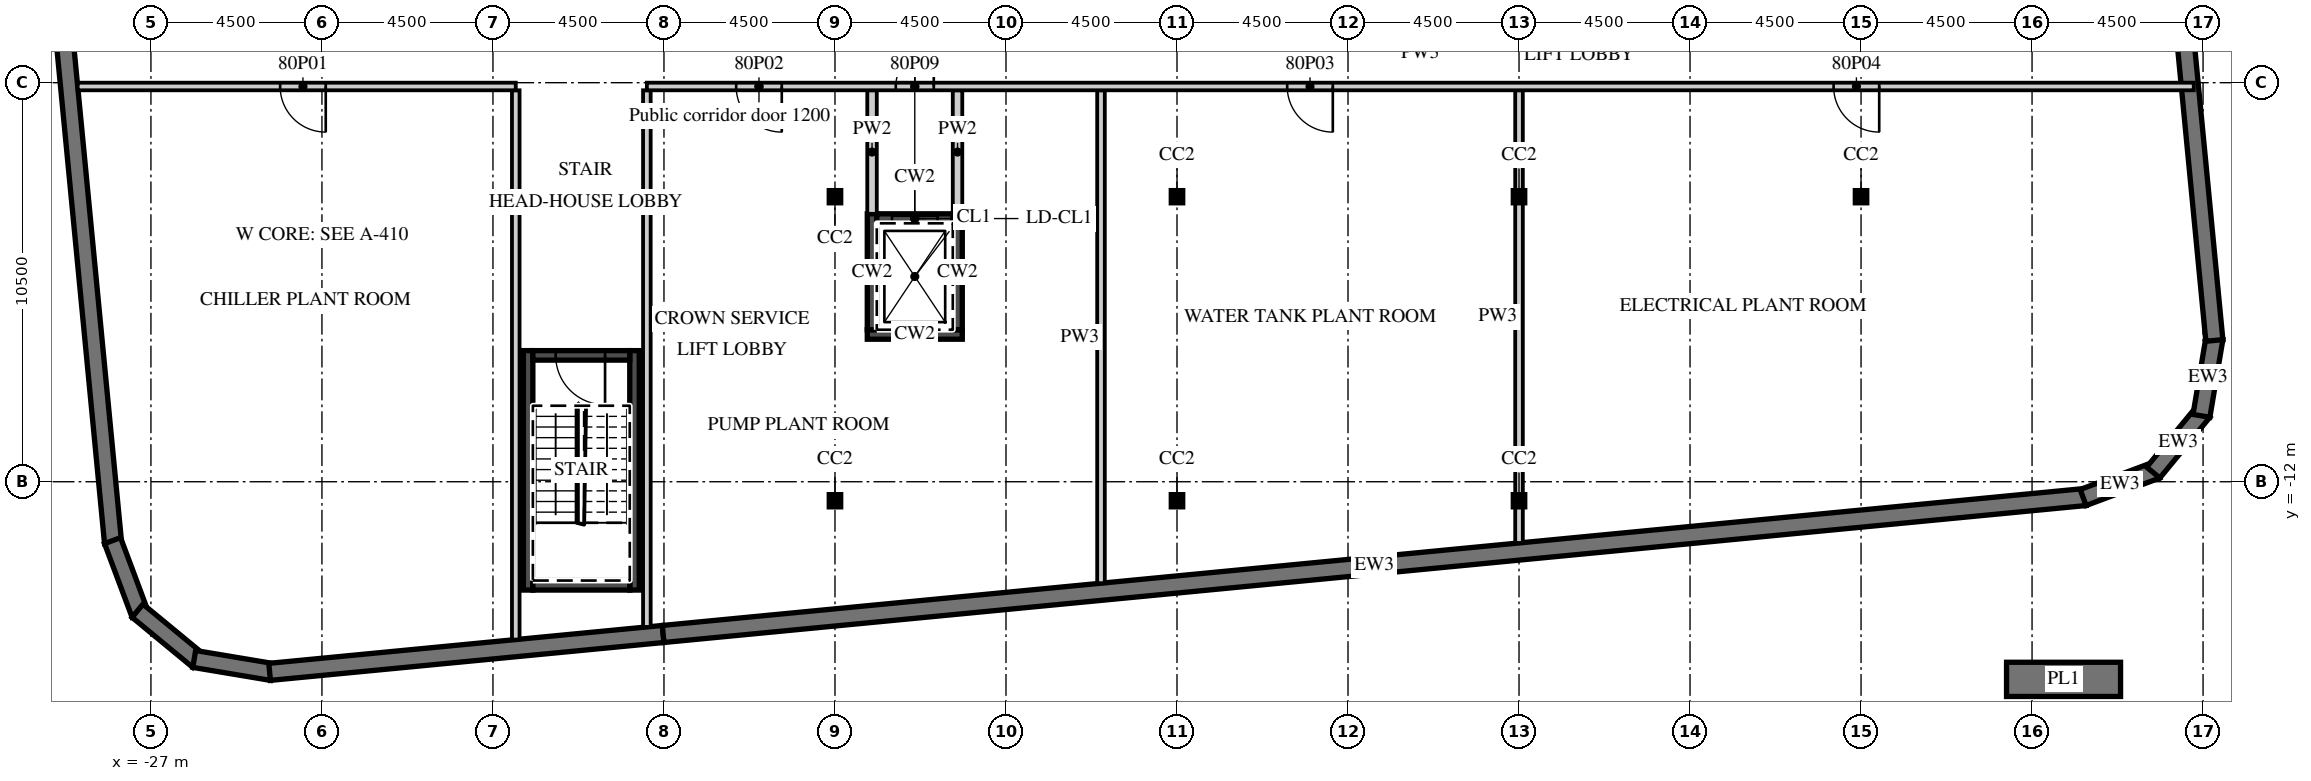
"""IFC4 building model, lengths in metres.
Left out: names, types, materials, properties, quantities, classifications, styles, units other than length and angle.
Written with IfcOpenShell. Run it as: python <this file> out.ifc"""

import sys

from ifc_helpers import new_model, si_unit, direction, frame, frame_2d, origin, origin_2d, place, context, subcontext, project, spatial, polyline, rectangle, i_section, outline, extrude, element, fill, save


model = new_model("IFC4")
c1 = context("Model", 3, precision=1e-05, world=origin(), true_north=direction((0.0, 1.0)))
c2 = subcontext(c1, "Body", "Model", "MODEL_VIEW")
j1 = project(units=[si_unit("LENGTHUNIT", "METRE"), si_unit("PLANEANGLEUNIT", "RADIAN")], contexts=[c1])
p1 = place(None, origin())
s1 = spatial("IfcSite", under=j1, at=p1, CompositionType="ELEMENT")
p2 = place(p1, origin())
s2 = spatial("IfcBuilding", under=s1, at=p2, CompositionType="ELEMENT")
p3 = place(p2, frame((0.0, 0.0, 317.8)))
s3 = spatial("IfcBuildingStorey", under=s2, at=p3, CompositionType="ELEMENT", Elevation=317.8)
for number, where, z_axis, x_axis in (
    (1, (-9.0, -12.5, 0.0), (0.0, 0.0, 1.0), (1.0, 0.0, 0.0)),
    (2, (-9.0, -4.5, 0.0), (0.0, 0.0, 1.0), (1.0, 0.0, 0.0)),
    (3, (0.0, -12.5, 0.0), (0.0, 0.0, 1.0), (1.0, 0.0, 0.0)),
    (4, (0.0, -4.5, 0.0), (0.0, 0.0, 1.0), (1.0, 0.0, 0.0)),
    (5, (9.0, -12.5, 0.0), (0.0, 0.0, 1.0), (1.0, 0.0, 0.0)),
    (6, (9.0, -4.5, 0.0), (0.0, 0.0, 1.0), (1.0, 0.0, 0.0)),
    (7, (18.0, -4.5, 0.0), (0.0, 0.0, 1.0), (1.0, 0.0, 0.0)),
):
    element("IfcColumn", number, at=place(p3, frame(where, z_axis=z_axis, x_axis=x_axis)), inside=s3, PredefinedType="COLUMN", context=c2, shape_type="SweptSolid", body=[
        extrude(i_section(OverallWidth=0.3, OverallDepth=0.32, WebThickness=0.011, FlangeThickness=0.021, FilletRadius=0.027, at=origin_2d()), origin(), (0.0, 0.0, 1.0), 4.0),
    ])
p4 = place(p3, frame((-30.297, 10.283, 0.0), z_axis=(0.0, 0.0, 1.0), x_axis=(0.095844987077, -0.995396272071, 0.0)))
e8 = element("IfcWall", 8, at=p4, inside=s3, PredefinedType="SOLIDWALL", context=c2, shape_type="SweptSolid", body=[
    extrude(rectangle(XDim=24.0, YDim=0.45, at=frame_2d((12.0, 0.0))), origin(), (0.0, 0.0, 1.0), 3.6),
])
p5 = place(p3, frame((-28.01, -13.55, 0.0), z_axis=(0.0, 0.0, 1.0), x_axis=(0.350192909346, -0.936677599948, 0.0)))
e9 = element("IfcWall", 9, at=p5, inside=s3, PredefinedType="SOLIDWALL", context=c2, shape_type="SweptSolid", body=[
    extrude(outline(polyline([(0.0, -0.225), (2.071, -0.225), (1.95, 0.225), (0.121, 0.225), (0.0, -0.225)])), origin(), (0.0, 0.0, 1.0), 3.6),
])
for number, where, z_axis, x_axis in (
    (10, (-27.353, -15.394, 0.0), (0.0, 0.0, 1.0), (0.772, -0.636, 0.0)),
    (11, (-25.861, -16.663, 0.0), (0.0, 0.0, 1.0), (0.986, -0.165, 0.0)),
):
    element("IfcWall", number, at=place(p3, frame(where, z_axis=z_axis, x_axis=x_axis)), inside=s3, PredefinedType="SOLIDWALL", context=c2, shape_type="SweptSolid", body=[
        extrude(outline(polyline([(0.0, -0.225), (2.071, -0.225), (1.95, 0.225), (0.121, 0.225), (0.0, -0.225)])), origin(), (0.0, 0.0, 1.0), 3.6),
    ])
p6 = place(p3, frame((-23.878, -17.003, 0.0), z_axis=(0.0, 0.0, 1.0), x_axis=(0.995395045647, 0.095857723225, 0.0)))
e12 = element("IfcWall", 12, at=p6, inside=s3, PredefinedType="SOLIDWALL", context=c2, shape_type="SweptSolid", body=[
    extrude(rectangle(XDim=10.404, YDim=0.45, at=frame_2d((5.202, 0.0))), origin(), (0.0, 0.0, 1.0), 3.6),
])
p7 = place(p3, frame((-13.521, -16.005, 0.0), z_axis=(0.0, 0.0, 1.0), x_axis=(0.995396551785, 0.095842082069, 0.0)))
e13 = element("IfcWall", 13, at=p7, inside=s3, PredefinedType="SOLIDWALL", context=c2, shape_type="SweptSolid", body=[
    extrude(rectangle(XDim=37.596, YDim=0.45, at=frame_2d((18.798, 0.0))), origin(), (0.0, 0.0, 1.0), 3.6),
])
for number, where, z_axis, x_axis in (
    (14, (23.844, -12.415, 0.0), (0.0, 0.0, 1.0), (0.937, 0.35, 0.0)),
    (15, (25.689, -11.758, 0.0), (0.0, 0.0, 1.0), (0.636, 0.772, 0.0)),
):
    element("IfcWall", number, at=place(p3, frame(where, z_axis=z_axis, x_axis=x_axis)), inside=s3, PredefinedType="SOLIDWALL", context=c2, shape_type="SweptSolid", body=[
        extrude(outline(polyline([(0.0, -0.225), (2.071, -0.225), (1.95, 0.225), (0.121, 0.225), (0.0, -0.225)])), origin(), (0.0, 0.0, 1.0), 3.6),
    ])
p8 = place(p3, frame((26.958, -10.266, 0.0), z_axis=(0.0, 0.0, 1.0), x_axis=(0.165068144653, 0.986282164302, 0.0)))
e16 = element("IfcWall", 16, at=p8, inside=s3, PredefinedType="SOLIDWALL", context=c2, shape_type="SweptSolid", body=[
    extrude(outline(polyline([(0.0, -0.225), (2.071, -0.225), (1.95, 0.225), (0.121, 0.225), (0.0, -0.225)])), origin(), (0.0, 0.0, 1.0), 3.6),
])
p9 = place(p3, frame((27.297, -8.283, 0.0), z_axis=(0.0, 0.0, 1.0), x_axis=(-0.095844987077, 0.995396272071, 0.0)))
e17 = element("IfcWall", 17, at=p9, inside=s3, PredefinedType="SOLIDWALL", context=c2, shape_type="SweptSolid", body=[
    extrude(rectangle(XDim=24.0, YDim=0.45, at=frame_2d((12.0, 0.0))), origin(), (0.0, 0.0, 1.0), 3.6),
])
p10 = place(p3, frame((24.829, -17.2, 0.0), z_axis=(0.0, 0.0, 1.0), x_axis=(-1.0, 0.0, 0.0)))
e18 = element("IfcWall", 18, at=p10, inside=s3, PredefinedType="SOLIDWALL", context=c2, shape_type="SweptSolid", body=[
    extrude(rectangle(XDim=3.0, YDim=0.9, at=frame_2d((1.5, 0.0))), origin(), (0.0, 0.0, 1.0), 0.6),
])
p11 = place(p3, frame((-8.15, -8.125, 0.0), z_axis=(0.0, 0.0, 1.0), x_axis=(1.0, 0.0, 0.0)))
e19 = element("IfcWall", 19, at=p11, inside=s3, PredefinedType="SHEAR", context=c2, shape_type="SweptSolid", body=[
    extrude(rectangle(XDim=2.5, YDim=0.25, at=frame_2d((1.25, 0.0))), origin(), (0.0, 0.0, 1.0), 3.6),
])
for number, where, z_axis, x_axis in (
    (20, (-8.025, -8.0, 0.0), (0.0, 0.0, 1.0), (0.0, 1.0, 0.0)),
    (21, (-5.775, -8.0, 0.0), (0.0, 0.0, 1.0), (0.0, 1.0, 0.0)),
):
    element("IfcWall", number, at=place(p3, frame(where, z_axis=z_axis, x_axis=x_axis)), inside=s3, PredefinedType="SHEAR", context=c2, shape_type="SweptSolid", body=[
        extrude(rectangle(XDim=3.05, YDim=0.25, at=frame_2d((1.525, 0.0))), origin(), (0.0, 0.0, 1.0), 3.6),
    ])
p12 = place(p3, frame((-7.9, -5.075, 0.0), z_axis=(0.0, 0.0, 1.0), x_axis=(1.0, 0.0, 0.0)))
e22 = element("IfcWall", 22, at=p12, inside=s3, PredefinedType="SHEAR", context=c2, shape_type="SweptSolid", body=[
    extrude(rectangle(XDim=2.0, YDim=0.25, at=frame_2d((1.0, 0.0))), origin(), (0.0, 0.0, 1.0), 3.6),
])
p13 = place(p12, frame((0.4, 0.0, 0.0)))
e23 = element("IfcOpeningElement", 23, at=p13, cuts=e22, PredefinedType="OPENING", context=c2, shape_type="SweptSolid", body=[
    extrude(rectangle(XDim=1.2, YDim=2.1, at=frame_2d((0.6, 1.05))), frame((0.0, 0.135, 0.0), z_axis=(0.0, -1.0, 0.0), x_axis=(1.0, 0.0, 0.0)), (0.0, 0.0, 1.0), 0.27),
])
for number, where, z_axis, x_axis in (
    (24, (-8.025, -4.95, 0.0), (0.0, 0.0, 1.0), (0.0, 1.0, 0.0)),
    (25, (-5.775, -4.95, 0.0), (0.0, 0.0, 1.0), (0.0, 1.0, 0.0)),
):
    element("IfcWall", number, at=place(p3, frame(where, z_axis=z_axis, x_axis=x_axis)), inside=s3, PredefinedType="PARTITIONING", context=c2, shape_type="SweptSolid", body=[
        extrude(rectangle(XDim=3.25, YDim=0.25, at=frame_2d((1.625, 0.0))), origin(), (0.0, 0.0, 1.0), 3.6),
    ])
for number, where, z_axis, x_axis in (
    (26, (-17.075, -14.85, 0.0), (0.0, 0.0, 1.0), (0.0, 1.0, 0.0)),
    (27, (-14.275, -14.85, 0.0), (0.0, 0.0, 1.0), (0.0, 1.0, 0.0)),
):
    element("IfcWall", number, at=place(p3, frame(where, z_axis=z_axis, x_axis=x_axis)), inside=s3, PredefinedType="SHEAR", context=c2, shape_type="SweptSolid", body=[
        extrude(rectangle(XDim=6.3, YDim=0.25, at=frame_2d((3.15, 0.0))), origin(), (0.0, 0.0, 1.0), 3.6),
    ])
p14 = place(p3, frame((-16.95, -14.725, 0.0), z_axis=(0.0, 0.0, 1.0), x_axis=(1.0, 0.0, 0.0)))
e28 = element("IfcWall", 28, at=p14, inside=s3, PredefinedType="SHEAR", context=c2, shape_type="SweptSolid", body=[
    extrude(rectangle(XDim=2.55, YDim=0.25, at=frame_2d((1.275, 0.0))), origin(), (0.0, 0.0, 1.0), 3.6),
])
p15 = place(p3, frame((-16.95, -8.675, 0.0), z_axis=(0.0, 0.0, 1.0), x_axis=(1.0, 0.0, 0.0)))
e29 = element("IfcWall", 29, at=p15, inside=s3, PredefinedType="SHEAR", context=c2, shape_type="SweptSolid", body=[
    extrude(rectangle(XDim=2.55, YDim=0.25, at=frame_2d((1.275, 0.0))), origin(), (0.0, 0.0, 1.0), 3.6),
])
p16 = place(p15, frame((0.6, 0.0, 0.0)))
e30 = element("IfcOpeningElement", 30, at=p16, cuts=e29, PredefinedType="OPENING", context=c2, shape_type="SweptSolid", body=[
    extrude(rectangle(XDim=1.3, YDim=2.1, at=frame_2d((0.65, 1.05))), frame((0.0, 0.135, 0.0), z_axis=(0.0, -1.0, 0.0), x_axis=(1.0, 0.0, 0.0)), (0.0, 0.0, 1.0), 0.27),
])
p17 = place(p3, frame((-17.4, -16.153, 0.0), z_axis=(0.0, 0.0, 1.0), x_axis=(0.0, 1.0, 0.0)))
e31 = element("IfcWall", 31, at=p17, inside=s3, PredefinedType="PARTITIONING", context=c2, shape_type="SweptSolid", body=[
    extrude(rectangle(XDim=14.453, YDim=0.2, at=frame_2d((7.227, 0.0))), origin(), (0.0, 0.0, 1.0), 3.6),
])
p18 = place(p3, frame((-13.95, -15.821, 0.0), z_axis=(0.0, 0.0, 1.0), x_axis=(0.0, 1.0, 0.0)))
e32 = element("IfcWall", 32, at=p18, inside=s3, PredefinedType="PARTITIONING", context=c2, shape_type="SweptSolid", body=[
    extrude(rectangle(XDim=14.121, YDim=0.2, at=frame_2d((7.06, 0.0))), origin(), (0.0, 0.0, 1.0), 3.6),
])
p19 = place(p3, frame((-2.0, -14.67, 0.0), z_axis=(0.0, 0.0, 1.0), x_axis=(0.0, 1.0, 0.0)))
e33 = element("IfcWall", 33, at=p19, inside=s3, PredefinedType="PARTITIONING", context=c2, shape_type="SweptSolid", body=[
    extrude(rectangle(XDim=12.97, YDim=0.2, at=frame_2d((6.485, 0.0))), origin(), (0.0, 0.0, 1.0), 3.6),
])
p20 = place(p3, frame((9.0, -13.611, 0.0), z_axis=(0.0, 0.0, 1.0), x_axis=(0.0, 1.0, 0.0)))
e34 = element("IfcWall", 34, at=p20, inside=s3, PredefinedType="PARTITIONING", context=c2, shape_type="SweptSolid", body=[
    extrude(rectangle(XDim=11.911, YDim=0.2, at=frame_2d((5.956, 0.0))), origin(), (0.0, 0.0, 1.0), 3.15),
])
p21 = place(p3, frame((-28.927, -1.6, 0.0), z_axis=(0.0, 0.0, 1.0), x_axis=(1.0, 0.0, 0.0)))
e35 = element("IfcWall", 35, at=p21, inside=s3, PredefinedType="PARTITIONING", context=c2, shape_type="SweptSolid", body=[
    extrude(rectangle(XDim=11.527, YDim=0.2, at=frame_2d((5.764, 0.0))), origin(), (0.0, 0.0, 1.0), 3.6),
])
p22 = place(p21, frame((5.327, 0.0, 0.0)))
e36 = element("IfcOpeningElement", 36, at=p22, cuts=e35, PredefinedType="OPENING", context=c2, shape_type="SweptSolid", body=[
    extrude(rectangle(XDim=1.2, YDim=2.1, at=frame_2d((0.6, 1.05))), frame((0.0, 0.11, 0.0), z_axis=(0.0, -1.0, 0.0), x_axis=(1.0, 0.0, 0.0)), (0.0, 0.0, 1.0), 0.22),
])
p23 = place(p3, frame((-13.95, -1.6, 0.0), z_axis=(0.0, 0.0, 1.0), x_axis=(1.0, 0.0, 0.0)))
e37 = element("IfcWall", 37, at=p23, inside=s3, PredefinedType="PARTITIONING", context=c2, shape_type="SweptSolid", body=[
    extrude(rectangle(XDim=40.705, YDim=0.2, at=frame_2d((20.353, 0.0))), origin(), (0.0, 0.0, 1.0), 3.15),
])
p24 = place(p23, frame((2.35, 0.0, 0.0)))
e38 = element("IfcOpeningElement", 38, at=p24, cuts=e37, PredefinedType="OPENING", context=c2, shape_type="SweptSolid", body=[
    extrude(rectangle(XDim=1.2, YDim=2.1, at=frame_2d((0.6, 1.05))), frame((0.0, 0.11, 0.0), z_axis=(0.0, -1.0, 0.0), x_axis=(1.0, 0.0, 0.0)), (0.0, 0.0, 1.0), 0.22),
])
p25 = place(p23, frame((16.85, 0.0, 0.0)))
e39 = element("IfcOpeningElement", 39, at=p25, cuts=e37, PredefinedType="OPENING", context=c2, shape_type="SweptSolid", body=[
    extrude(rectangle(XDim=1.2, YDim=2.1, at=frame_2d((0.6, 1.05))), frame((0.0, 0.11, 0.0), z_axis=(0.0, -1.0, 0.0), x_axis=(1.0, 0.0, 0.0)), (0.0, 0.0, 1.0), 0.22),
])
p26 = place(p23, frame((31.228, 0.0, 0.0)))
e40 = element("IfcOpeningElement", 40, at=p26, cuts=e37, PredefinedType="OPENING", context=c2, shape_type="SweptSolid", body=[
    extrude(rectangle(XDim=1.2, YDim=2.1, at=frame_2d((0.6, 1.05))), frame((0.0, 0.11, 0.0), z_axis=(0.0, -1.0, 0.0), x_axis=(1.0, 0.0, 0.0)), (0.0, 0.0, 1.0), 0.22),
])
p27 = place(p23, frame((6.55, 0.0, 0.0)))
e41 = element("IfcOpeningElement", 41, at=p27, cuts=e37, PredefinedType="OPENING", context=c2, shape_type="SweptSolid", body=[
    extrude(rectangle(XDim=1.0, YDim=2.1, at=frame_2d((0.5, 1.05))), frame((0.0, 0.11, 0.0), z_axis=(0.0, -1.0, 0.0), x_axis=(1.0, 0.0, 0.0)), (0.0, 0.0, 1.0), 0.22),
])
p28 = place(p13, origin())
e42 = element("IfcDoor", 42, at=p28, inside=s3, OperationType="SLIDING_TO_LEFT", PredefinedType="DOOR", context=c2, shape_type="SweptSolid", body=[
    extrude(rectangle(XDim=1.2, YDim=2.1, at=frame_2d((0.6, 1.05))), frame((0.0, 0.025, 0.0), z_axis=(0.0, -1.0, 0.0), x_axis=(1.0, 0.0, 0.0)), (0.0, 0.0, 1.0), 0.05),
])
fill(e23, e42)
p29 = place(p16, origin())
e43 = element("IfcDoor", 43, at=p29, inside=s3, OperationType="SINGLE_SWING_RIGHT", PredefinedType="DOOR", context=c2, shape_type="SweptSolid", body=[
    extrude(rectangle(XDim=1.3, YDim=2.1, at=frame_2d((0.65, 1.05))), frame((0.0, 0.025, 0.0), z_axis=(0.0, -1.0, 0.0), x_axis=(1.0, 0.0, 0.0)), (0.0, 0.0, 1.0), 0.05),
])
fill(e30, e43)
p30 = place(p22, origin())
e44 = element("IfcDoor", 44, at=p30, inside=s3, OperationType="SINGLE_SWING_RIGHT", PredefinedType="DOOR", context=c2, shape_type="SweptSolid", body=[
    extrude(rectangle(XDim=1.2, YDim=2.1, at=frame_2d((0.6, 1.05))), frame((0.0, 0.025, 0.0), z_axis=(0.0, -1.0, 0.0), x_axis=(1.0, 0.0, 0.0)), (0.0, 0.0, 1.0), 0.05),
])
fill(e36, e44)
p31 = place(p24, origin())
e45 = element("IfcDoor", 45, at=p31, inside=s3, OperationType="SINGLE_SWING_RIGHT", PredefinedType="DOOR", context=c2, shape_type="SweptSolid", body=[
    extrude(rectangle(XDim=1.2, YDim=2.1, at=frame_2d((0.6, 1.05))), frame((0.0, 0.025, 0.0), z_axis=(0.0, -1.0, 0.0), x_axis=(1.0, 0.0, 0.0)), (0.0, 0.0, 1.0), 0.05),
])
fill(e38, e45)
p32 = place(p25, origin())
e46 = element("IfcDoor", 46, at=p32, inside=s3, OperationType="SINGLE_SWING_RIGHT", PredefinedType="DOOR", context=c2, shape_type="SweptSolid", body=[
    extrude(rectangle(XDim=1.2, YDim=2.1, at=frame_2d((0.6, 1.05))), frame((0.0, 0.025, 0.0), z_axis=(0.0, -1.0, 0.0), x_axis=(1.0, 0.0, 0.0)), (0.0, 0.0, 1.0), 0.05),
])
fill(e39, e46)
p33 = place(p26, origin())
e47 = element("IfcDoor", 47, at=p33, inside=s3, OperationType="SINGLE_SWING_RIGHT", PredefinedType="DOOR", context=c2, shape_type="SweptSolid", body=[
    extrude(rectangle(XDim=1.2, YDim=2.1, at=frame_2d((0.6, 1.05))), frame((0.0, 0.025, 0.0), z_axis=(0.0, -1.0, 0.0), x_axis=(1.0, 0.0, 0.0)), (0.0, 0.0, 1.0), 0.05),
])
fill(e40, e47)
p34 = place(p27, origin())
e48 = element("IfcDoor", 48, at=p34, inside=s3, OperationType="SINGLE_SWING_RIGHT", PredefinedType="DOOR", context=c2, shape_type="SweptSolid", body=[
    extrude(rectangle(XDim=1.0, YDim=2.1, at=frame_2d((0.5, 1.05))), frame((0.0, 0.025, 0.0), z_axis=(0.0, -1.0, 0.0), x_axis=(1.0, 0.0, 0.0)), (0.0, 0.0, 1.0), 0.05),
])
fill(e41, e48)
save(model, sys.argv[1])
